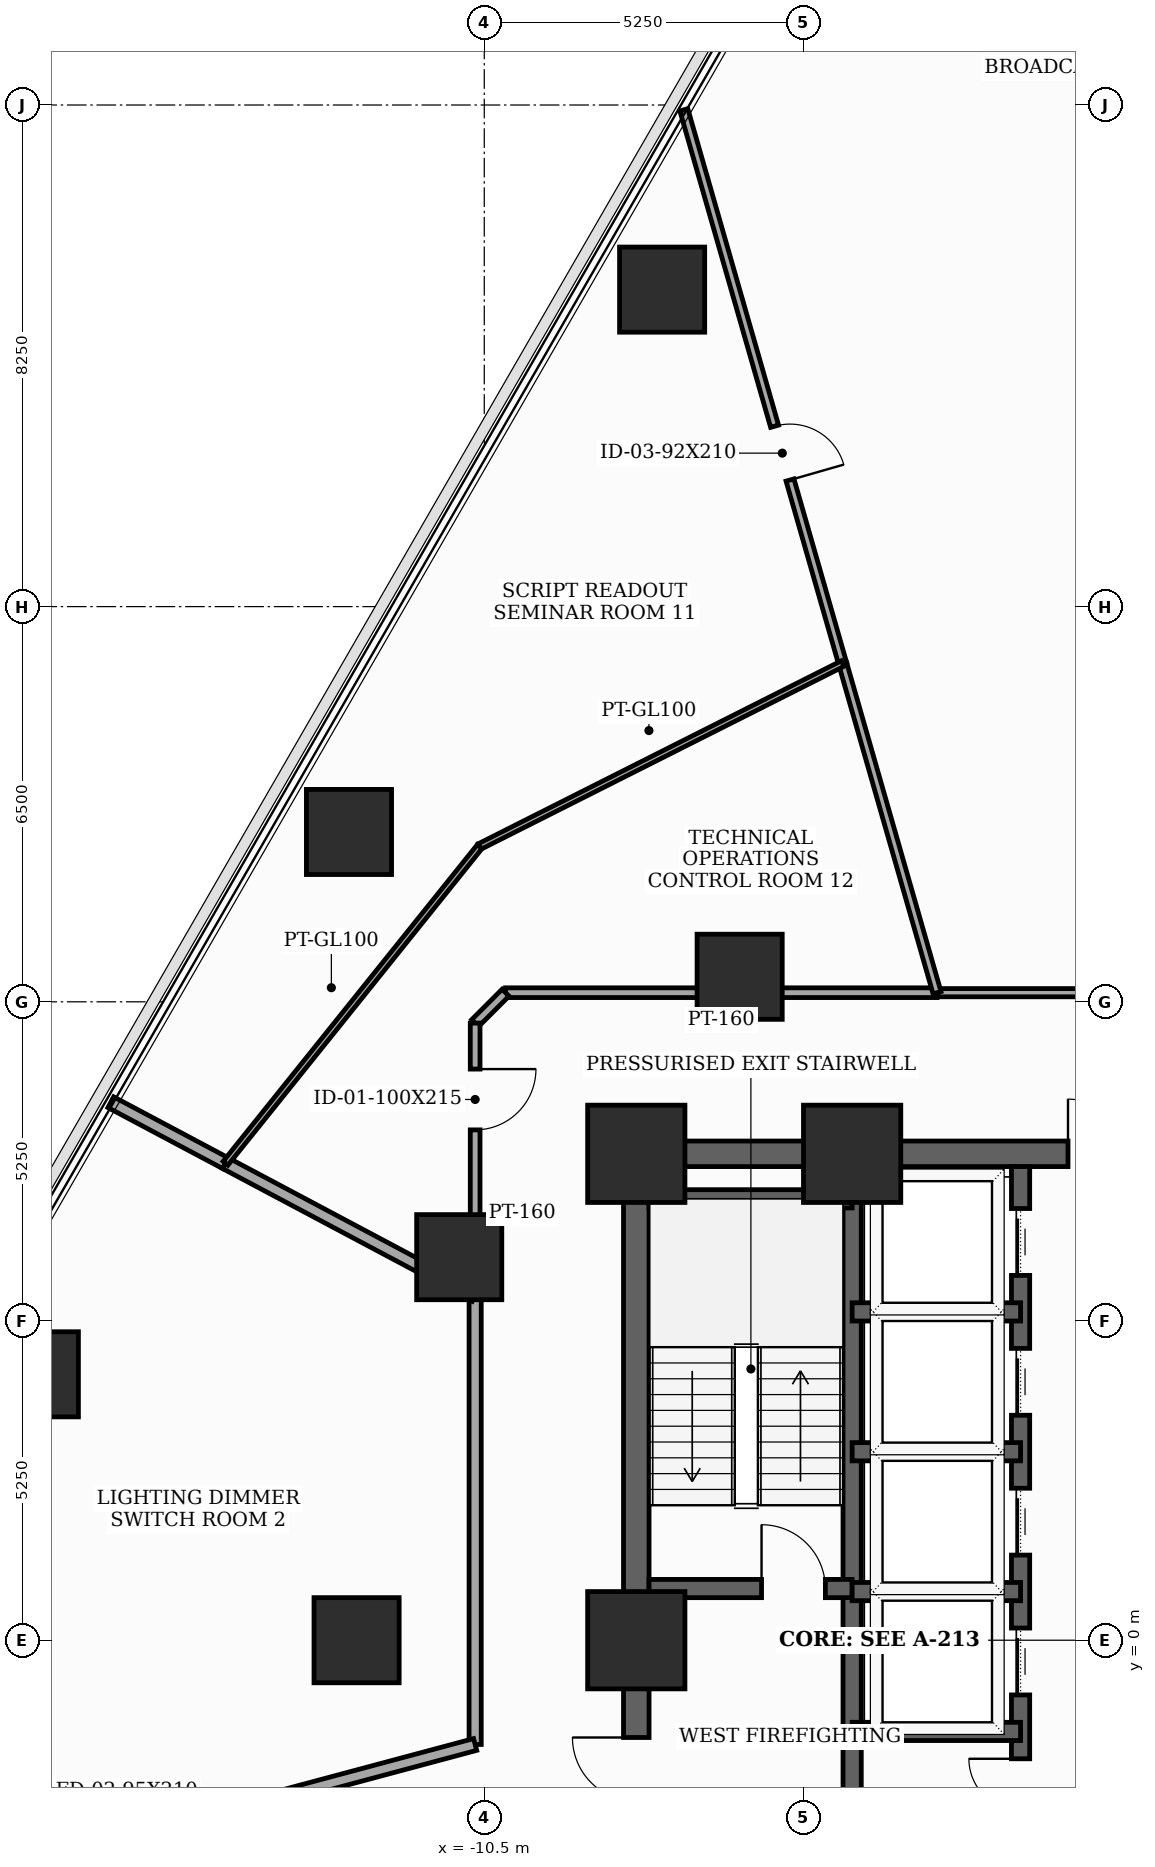
"""IFC4 building model, lengths in metres.
Left out: names, types, materials, properties, quantities, classifications, styles, units other than length and angle.
Written with IfcOpenShell. Run it as: python <this file> out.ifc"""

import sys

from ifc_helpers import new_model, si_unit, direction, frame, frame_2d, origin, origin_2d, place, context, subcontext, project, spatial, rectangle, extrude, element, fill, save


model = new_model("IFC4")
c1 = context("Model", 3, precision=1e-05, world=origin(), true_north=direction((0.0, 1.0)))
c2 = subcontext(c1, "Body", "Model", "MODEL_VIEW")
j1 = project(units=[si_unit("LENGTHUNIT", "METRE"), si_unit("PLANEANGLEUNIT", "RADIAN")], contexts=[c1])
p1 = place(None, origin())
s1 = spatial("IfcSite", under=j1, at=p1, CompositionType="ELEMENT")
p2 = place(p1, origin())
s2 = spatial("IfcBuilding", under=s1, at=p2, CompositionType="ELEMENT")
p3 = place(p2, frame((0.0, 0.0, 37.1)))
s3 = spatial("IfcBuildingStorey", under=s2, at=p3, CompositionType="ELEMENT", Elevation=37.1)
for number, where, z_axis, x_axis in (
    (1, (-4.45, 8.0, 0.0), (0.0, 0.0, 1.0), (1.0, 0.0, 0.0)),
    (2, (-8.0, 8.0, 0.0), (0.0, 0.0, 1.0), (1.0, 0.0, 0.0)),
    (3, (-8.0, 0.0, 0.0), (0.0, 0.0, 1.0), (1.0, 0.0, 0.0)),
):
    element("IfcColumn", number, at=place(p3, frame(where, z_axis=z_axis, x_axis=x_axis)), inside=s3, PredefinedType="COLUMN", context=c2, shape_type="SweptSolid", body=[
        extrude(rectangle(XDim=1.6, YDim=1.6, at=origin_2d()), origin(), (0.0, 0.0, 1.0), 3.7),
    ])
for number, where, z_axis, x_axis in (
    (4, (-6.3, 10.912, 0.0), (0.0, 0.0, 1.0), (1.0, 0.0, 0.0)),
    (5, (-10.912, 6.3, 0.0), (0.0, 0.0, 1.0), (1.0, 0.0, 0.0)),
    (6, (-12.6, 0.0, 0.0), (0.0, 0.0, 1.0), (1.0, 0.0, 0.0)),
    (7, (-7.575, 22.213, 0.0), (0.0, 0.0, 1.0), (1.0, 0.0, 0.0)),
    (8, (-12.725, 13.293, 0.0), (0.0, 0.0, 1.0), (1.0, 0.0, 0.0)),
    (9, (-17.875, 4.373, 0.0), (0.0, 0.0, 1.0), (1.0, 0.0, 0.0)),
):
    element("IfcColumn", number, at=place(p3, frame(where, z_axis=z_axis, x_axis=x_axis)), inside=s3, PredefinedType="COLUMN", context=c2, shape_type="SweptSolid", body=[
        extrude(rectangle(XDim=1.4, YDim=1.4, at=origin_2d()), origin(), (0.0, 0.0, 1.0), 3.7),
    ])
p4 = place(p3, frame((-8.0, -8.0, 0.0), z_axis=(0.0, 0.0, 1.0), x_axis=(0.0, 1.0, 0.0)))
e10 = element("IfcWall", 10, at=p4, inside=s3, PredefinedType="SHEAR", context=c2, shape_type="SweptSolid", body=[
    extrude(rectangle(XDim=16.0, YDim=0.42, at=frame_2d((8.0, 0.0))), origin(), (0.0, 0.0, 1.0), 3.5),
])
p5 = place(p4, frame((1.002, 0.0, 0.0)))
e11 = element("IfcOpeningElement", 11, at=p5, cuts=e10, PredefinedType="OPENING", context=c2, shape_type="SweptSolid", body=[
    extrude(rectangle(XDim=0.85, YDim=2.02, at=frame_2d((0.425, 1.01))), frame((0.0, 0.22, 0.0), z_axis=(0.0, -1.0, 0.0), x_axis=(1.0, 0.0, 0.0)), (0.0, 0.0, 1.0), 0.44),
])
p6 = place(p4, frame((5.35, 0.0, 0.0)))
e12 = element("IfcOpeningElement", 12, at=p6, cuts=e10, PredefinedType="OPENING", context=c2, shape_type="SweptSolid", body=[
    extrude(rectangle(XDim=1.05, YDim=2.15, at=frame_2d((0.525, 1.075))), frame((0.0, 0.22, 0.0), z_axis=(0.0, -1.0, 0.0), x_axis=(1.0, 0.0, 0.0)), (0.0, 0.0, 1.0), 0.44),
])
p7 = place(p3, frame((-8.0, 8.0, 0.0), z_axis=(0.0, 0.0, 1.0), x_axis=(1.0, 0.0, 0.0)))
e13 = element("IfcWall", 13, at=p7, inside=s3, PredefinedType="SHEAR", context=c2, shape_type="SweptSolid", body=[
    extrude(rectangle(XDim=16.0, YDim=0.42, at=frame_2d((8.0, 0.0))), origin(), (0.0, 0.0, 1.0), 3.5),
])
p8 = place(p7, frame((7.1, 0.0, 0.0)))
e14 = element("IfcOpeningElement", 14, at=p8, cuts=e13, PredefinedType="OPENING", context=c2, shape_type="SweptSolid", body=[
    extrude(rectangle(XDim=1.8, YDim=2.15, at=frame_2d((0.9, 1.075))), frame((0.0, 0.22, 0.0), z_axis=(0.0, -1.0, 0.0), x_axis=(1.0, 0.0, 0.0)), (0.0, 0.0, 1.0), 0.44),
])
p9 = place(p3, frame((-4.45, -7.79, 0.0), z_axis=(0.0, 0.0, 1.0), x_axis=(0.0, 1.0, 0.0)))
e15 = element("IfcWall", 15, at=p9, inside=s3, PredefinedType="SHEAR", context=c2, shape_type="SweptSolid", body=[
    extrude(rectangle(XDim=15.58, YDim=0.3, at=frame_2d((7.79, 0.0))), origin(), (0.0, 0.0, 1.0), 3.5),
])
p10 = place(p3, frame((-7.79, 0.85, 0.0), z_axis=(0.0, 0.0, 1.0), x_axis=(1.0, 0.0, 0.0)))
e16 = element("IfcWall", 16, at=p10, inside=s3, PredefinedType="SHEAR", context=c2, shape_type="SweptSolid", body=[
    extrude(rectangle(XDim=3.34, YDim=0.3, at=frame_2d((1.67, 0.0))), origin(), (0.0, 0.0, 1.0), 3.5),
])
p11 = place(p10, frame((1.85, 0.0, 0.0)))
e17 = element("IfcOpeningElement", 17, at=p11, cuts=e16, PredefinedType="OPENING", context=c2, shape_type="SweptSolid", body=[
    extrude(rectangle(XDim=1.05, YDim=2.15, at=frame_2d((0.525, 1.075))), frame((0.0, 0.16, 0.0), z_axis=(0.0, -1.0, 0.0), x_axis=(1.0, 0.0, 0.0)), (0.0, 0.0, 1.0), 0.32),
])
p12 = place(p3, frame((-7.79, 7.26, 0.0), z_axis=(0.0, 0.0, 1.0), x_axis=(1.0, 0.0, 0.0)))
e18 = element("IfcWall", 18, at=p12, inside=s3, PredefinedType="SHEAR", context=c2, shape_type="SweptSolid", body=[
    extrude(rectangle(XDim=3.34, YDim=0.3, at=frame_2d((1.67, 0.0))), origin(), (0.0, 0.0, 1.0), 3.5),
])
p13 = place(p3, frame((-1.68, -4.85, 0.0), z_axis=(0.0, 0.0, 1.0), x_axis=(0.0, 1.0, 0.0)))
e19 = element("IfcWall", 19, at=p13, inside=s3, PredefinedType="SHEAR", context=c2, shape_type="SweptSolid", body=[
    extrude(rectangle(XDim=12.64, YDim=0.3, at=frame_2d((6.32, 0.0))), origin(), (0.0, 0.0, 1.0), 3.5),
])
p14 = place(p13, frame((3.95, 0.0, 0.0)))
e20 = element("IfcOpeningElement", 20, at=p14, cuts=e19, PredefinedType="OPENING", context=c2, shape_type="SweptSolid", body=[
    extrude(rectangle(XDim=1.1, YDim=2.1, at=frame_2d((0.55, 1.05))), frame((0.0, 0.16, 0.0), z_axis=(0.0, -1.0, 0.0), x_axis=(1.0, 0.0, 0.0)), (0.0, 0.0, 1.0), 0.32),
])
p15 = place(p13, frame((6.25, 0.0, 0.0)))
e21 = element("IfcOpeningElement", 21, at=p15, cuts=e19, PredefinedType="OPENING", context=c2, shape_type="SweptSolid", body=[
    extrude(rectangle(XDim=1.1, YDim=2.1, at=frame_2d((0.55, 1.05))), frame((0.0, 0.16, 0.0), z_axis=(0.0, -1.0, 0.0), x_axis=(1.0, 0.0, 0.0)), (0.0, 0.0, 1.0), 0.32),
])
p16 = place(p13, frame((8.55, 0.0, 0.0)))
e22 = element("IfcOpeningElement", 22, at=p16, cuts=e19, PredefinedType="OPENING", context=c2, shape_type="SweptSolid", body=[
    extrude(rectangle(XDim=1.1, YDim=2.1, at=frame_2d((0.55, 1.05))), frame((0.0, 0.16, 0.0), z_axis=(0.0, -1.0, 0.0), x_axis=(1.0, 0.0, 0.0)), (0.0, 0.0, 1.0), 0.32),
])
p17 = place(p13, frame((10.85, 0.0, 0.0)))
e23 = element("IfcOpeningElement", 23, at=p17, cuts=e19, PredefinedType="OPENING", context=c2, shape_type="SweptSolid", body=[
    extrude(rectangle(XDim=1.1, YDim=2.1, at=frame_2d((0.55, 1.05))), frame((0.0, 0.16, 0.0), z_axis=(0.0, -1.0, 0.0), x_axis=(1.0, 0.0, 0.0)), (0.0, 0.0, 1.0), 0.32),
])
p18 = place(p13, frame((0.45, 0.0, 0.0)))
e24 = element("IfcOpeningElement", 24, at=p18, cuts=e19, PredefinedType="OPENING", context=c2, shape_type="SweptSolid", body=[
    extrude(rectangle(XDim=0.85, YDim=2.02, at=frame_2d((0.425, 1.01))), frame((0.0, 0.16, 0.0), z_axis=(0.0, -1.0, 0.0), x_axis=(1.0, 0.0, 0.0)), (0.0, 0.0, 1.0), 0.32),
])
p19 = place(p13, frame((2.05, 0.0, 0.0)))
e25 = element("IfcOpeningElement", 25, at=p19, cuts=e19, PredefinedType="OPENING", context=c2, shape_type="SweptSolid", body=[
    extrude(rectangle(XDim=0.85, YDim=2.02, at=frame_2d((0.425, 1.01))), frame((0.0, 0.16, 0.0), z_axis=(0.0, -1.0, 0.0), x_axis=(1.0, 0.0, 0.0)), (0.0, 0.0, 1.0), 0.32),
])
for number, where, z_axis, x_axis in (
    (26, (-4.45, -1.5, 0.0), (0.0, 0.0, 1.0), (1.0, 0.0, 0.0)),
    (27, (-4.45, 0.8, 0.0), (0.0, 0.0, 1.0), (1.0, 0.0, 0.0)),
    (28, (-4.45, 3.1, 0.0), (0.0, 0.0, 1.0), (1.0, 0.0, 0.0)),
    (29, (-4.45, 5.4, 0.0), (0.0, 0.0, 1.0), (1.0, 0.0, 0.0)),
):
    element("IfcWall", number, at=place(p3, frame(where, z_axis=z_axis, x_axis=x_axis)), inside=s3, PredefinedType="SHEAR", context=c2, shape_type="SweptSolid", body=[
        extrude(rectangle(XDim=2.77, YDim=0.3, at=frame_2d((1.385, 0.0))), origin(), (0.0, 0.0, 1.0), 3.5),
    ])
p20 = place(p3, frame((1.715, 10.65, 0.0), z_axis=(0.0, 0.0, 1.0), x_axis=(-1.0, 0.0, 0.0)))
e30 = element("IfcWall", 30, at=p20, inside=s3, PredefinedType="PARTITIONING", context=c2, shape_type="SweptSolid", body=[
    extrude(rectangle(XDim=4.769, YDim=0.135, at=frame_2d((2.385, 0.0))), origin(), (0.0, 0.0, 1.0), 2.785),
])
p21 = place(p3, frame((-10.65, 5.663, 0.0), z_axis=(0.0, 0.0, 1.0), x_axis=(0.0, -1.0, 0.0)))
e31 = element("IfcWall", 31, at=p21, inside=s3, PredefinedType="SOLIDWALL", context=c2, shape_type="SweptSolid", body=[
    extrude(rectangle(XDim=7.378, YDim=0.2, at=frame_2d((3.689, 0.0))), origin(), (0.0, 0.0, 1.0), 2.785),
])
p22 = place(p3, frame((-10.65, -1.715, 0.0), z_axis=(0.0, 0.0, 1.0), x_axis=(-0.965926659449, -0.258815935688, 0.0)))
e32 = element("IfcWall", 32, at=p22, inside=s3, PredefinedType="SOLIDWALL", context=c2, shape_type="SweptSolid", body=[
    extrude(rectangle(XDim=11.87, YDim=0.2, at=frame_2d((5.935, 0.0))), origin(), (0.0, 0.0, 1.0), 2.785),
])
p23 = place(p22, frame((5.46, 0.0, 0.0)))
e33 = element("IfcOpeningElement", 33, at=p23, cuts=e32, PredefinedType="OPENING", context=c2, shape_type="SweptSolid", body=[
    extrude(rectangle(XDim=0.95, YDim=2.1, at=frame_2d((0.475, 1.05))), frame((0.0, 0.11, 0.0), z_axis=(0.0, -1.0, 0.0), x_axis=(1.0, 0.0, 0.0)), (0.0, 0.0, 1.0), 0.22),
])
p24 = place(p3, frame((-3.054, 10.65, 0.0), z_axis=(0.0, 0.0, 1.0), x_axis=(-1.0, 0.0, 0.0)))
e34 = element("IfcWall", 34, at=p24, inside=s3, PredefinedType="PARTITIONING", context=c2, shape_type="SweptSolid", body=[
    extrude(rectangle(XDim=7.096, YDim=0.16, at=frame_2d((3.548, 0.0))), origin(), (0.0, 0.0, 1.0), 2.685),
])
p25 = place(p3, frame((-10.15, 10.65, 0.0), z_axis=(0.0, 0.0, 1.0), x_axis=(-0.707106781187, -0.707106781187, 0.0)))
e35 = element("IfcWall", 35, at=p25, inside=s3, PredefinedType="PARTITIONING", context=c2, shape_type="SweptSolid", body=[
    extrude(rectangle(XDim=0.707, YDim=0.16, at=frame_2d((0.354, 0.0))), origin(), (0.0, 0.0, 1.0), 3.5),
])
p26 = place(p3, frame((-10.65, 10.15, 0.0), z_axis=(0.0, 0.0, 1.0), x_axis=(0.0, -1.0, 0.0)))
e36 = element("IfcWall", 36, at=p26, inside=s3, PredefinedType="PARTITIONING", context=c2, shape_type="SweptSolid", body=[
    extrude(rectangle(XDim=4.487, YDim=0.16, at=frame_2d((2.243, 0.0))), origin(), (0.0, 0.0, 1.0), 2.785),
])
p27 = place(p26, frame((0.756, 0.0, 0.0)))
e37 = element("IfcOpeningElement", 37, at=p27, cuts=e36, PredefinedType="OPENING", context=c2, shape_type="SweptSolid", body=[
    extrude(rectangle(XDim=1.0, YDim=2.15, at=frame_2d((0.5, 1.075))), frame((0.0, 0.09, 0.0), z_axis=(0.0, -1.0, 0.0), x_axis=(1.0, 0.0, 0.0)), (0.0, 0.0, 1.0), 0.18),
])
p28 = place(p3, frame((-7.218, 25.171, 0.0), z_axis=(0.0, 0.0, 1.0), x_axis=(0.275694254482, -0.961245378686, 0.0)))
e38 = element("IfcWall", 38, at=p28, inside=s3, PredefinedType="PARTITIONING", context=c2, shape_type="SweptSolid", body=[
    extrude(rectangle(XDim=9.475, YDim=0.135, at=frame_2d((4.738, 0.0))), origin(), (0.0, 0.0, 1.0), 2.935),
])
p29 = place(p28, frame((5.415, 0.0, 0.0)))
e39 = element("IfcOpeningElement", 39, at=p29, cuts=e38, PredefinedType="OPENING", context=c2, shape_type="SweptSolid", body=[
    extrude(rectangle(XDim=0.92, YDim=2.1, at=frame_2d((0.46, 1.05))), frame((0.0, 0.077, 0.0), z_axis=(0.0, -1.0, 0.0), x_axis=(1.0, 0.0, 0.0)), (0.0, 0.0, 1.0), 0.155),
])
p30 = place(p3, frame((-4.606, 16.063, 0.0), z_axis=(0.0, 0.0, 1.0), x_axis=(0.275608564, -0.961269951392, 0.0)))
e40 = element("IfcWall", 40, at=p30, inside=s3, PredefinedType="PARTITIONING", context=c2, shape_type="SweptSolid", body=[
    extrude(rectangle(XDim=5.631, YDim=0.135, at=frame_2d((2.815, 0.0))), origin(), (0.0, 0.0, 1.0), 2.785),
])
p31 = place(p3, frame((-14.755, 7.845, 0.0), z_axis=(0.0, 0.0, 1.0), x_axis=(-0.882905636776, 0.469550462197, 0.0)))
e41 = element("IfcWall", 41, at=p31, inside=s3, PredefinedType="SOLIDWALL", context=c2, shape_type="SweptSolid", body=[
    extrude(rectangle(XDim=2.137, YDim=0.2, at=frame_2d((1.069, 0.0))), origin(), (0.0, 0.0, 1.0), 2.935),
])
p32 = place(p3, frame((-10.65, 5.663, 0.0), z_axis=(0.0, 0.0, 1.0), x_axis=(-0.883016425854, 0.46934208385, 0.0)))
e42 = element("IfcWall", 42, at=p32, inside=s3, PredefinedType="SOLIDWALL", context=c2, shape_type="SweptSolid", body=[
    extrude(rectangle(XDim=4.649, YDim=0.2, at=frame_2d((2.324, 0.0))), origin(), (0.0, 0.0, 1.0), 2.785),
])
p33 = place(p3, frame((-14.755, 7.845, 0.0), z_axis=(0.0, 0.0, 1.0), x_axis=(0.625893000506, 0.779908938222, 0.0)))
e43 = element("IfcWall", 43, at=p33, inside=s3, PredefinedType="MOVABLE", context=c2, shape_type="SweptSolid", body=[
    extrude(rectangle(XDim=6.681, YDim=0.1, at=frame_2d((3.341, 0.0))), origin(), (0.0, 0.0, 1.0), 2.685),
])
p34 = place(p3, frame((-10.573, 13.056, 0.0), z_axis=(0.0, 0.0, 1.0), x_axis=(0.893012396789, 0.450032064615, 0.0)))
e44 = element("IfcWall", 44, at=p34, inside=s3, PredefinedType="MOVABLE", context=c2, shape_type="SweptSolid", body=[
    extrude(rectangle(XDim=6.682, YDim=0.1, at=frame_2d((3.341, 0.0))), origin(), (0.0, 0.0, 1.0), 2.685),
])
p35 = place(p6, origin())
e45 = element("IfcDoor", 45, at=p35, inside=s3, OperationType="SINGLE_SWING_RIGHT", PredefinedType="DOOR", context=c2, shape_type="SweptSolid", body=[
    extrude(rectangle(XDim=1.05, YDim=2.15, at=frame_2d((0.525, 1.075))), frame((0.0, 0.025, 0.0), z_axis=(0.0, -1.0, 0.0), x_axis=(1.0, 0.0, 0.0)), (0.0, 0.0, 1.0), 0.05),
])
fill(e12, e45)
p36 = place(p8, origin())
e46 = element("IfcDoor", 46, at=p36, inside=s3, OperationType="DOUBLE_DOOR_SINGLE_SWING", PredefinedType="DOOR", context=c2, shape_type="SweptSolid", body=[
    extrude(rectangle(XDim=1.8, YDim=2.15, at=frame_2d((0.9, 1.075))), frame((0.0, 0.025, 0.0), z_axis=(0.0, -1.0, 0.0), x_axis=(1.0, 0.0, 0.0)), (0.0, 0.0, 1.0), 0.05),
])
fill(e14, e46)
p37 = place(p11, origin())
e47 = element("IfcDoor", 47, at=p37, inside=s3, OperationType="SINGLE_SWING_LEFT", PredefinedType="DOOR", context=c2, shape_type="SweptSolid", body=[
    extrude(rectangle(XDim=1.05, YDim=2.15, at=frame_2d((0.525, 1.075))), frame((0.0, 0.025, 0.0), z_axis=(0.0, -1.0, 0.0), x_axis=(1.0, 0.0, 0.0)), (0.0, 0.0, 1.0), 0.05),
])
fill(e17, e47)
p38 = place(p14, origin())
e48 = element("IfcDoor", 48, at=p38, inside=s3, OperationType="SLIDING_TO_LEFT", PredefinedType="DOOR", context=c2, shape_type="SweptSolid", body=[
    extrude(rectangle(XDim=1.1, YDim=2.1, at=frame_2d((0.55, 1.05))), frame((0.0, 0.025, 0.0), z_axis=(0.0, -1.0, 0.0), x_axis=(1.0, 0.0, 0.0)), (0.0, 0.0, 1.0), 0.05),
])
fill(e20, e48)
p39 = place(p15, origin())
e49 = element("IfcDoor", 49, at=p39, inside=s3, OperationType="SLIDING_TO_LEFT", PredefinedType="DOOR", context=c2, shape_type="SweptSolid", body=[
    extrude(rectangle(XDim=1.1, YDim=2.1, at=frame_2d((0.55, 1.05))), frame((0.0, 0.025, 0.0), z_axis=(0.0, -1.0, 0.0), x_axis=(1.0, 0.0, 0.0)), (0.0, 0.0, 1.0), 0.05),
])
fill(e21, e49)
p40 = place(p16, origin())
e50 = element("IfcDoor", 50, at=p40, inside=s3, OperationType="SLIDING_TO_LEFT", PredefinedType="DOOR", context=c2, shape_type="SweptSolid", body=[
    extrude(rectangle(XDim=1.1, YDim=2.1, at=frame_2d((0.55, 1.05))), frame((0.0, 0.025, 0.0), z_axis=(0.0, -1.0, 0.0), x_axis=(1.0, 0.0, 0.0)), (0.0, 0.0, 1.0), 0.05),
])
fill(e22, e50)
p41 = place(p17, origin())
e51 = element("IfcDoor", 51, at=p41, inside=s3, OperationType="SLIDING_TO_LEFT", PredefinedType="DOOR", context=c2, shape_type="SweptSolid", body=[
    extrude(rectangle(XDim=1.1, YDim=2.1, at=frame_2d((0.55, 1.05))), frame((0.0, 0.025, 0.0), z_axis=(0.0, -1.0, 0.0), x_axis=(1.0, 0.0, 0.0)), (0.0, 0.0, 1.0), 0.05),
])
fill(e23, e51)
p42 = place(p19, origin())
e52 = element("IfcDoor", 52, at=p42, inside=s3, OperationType="SINGLE_SWING_RIGHT", PredefinedType="TRAPDOOR", context=c2, shape_type="SweptSolid", body=[
    extrude(rectangle(XDim=0.85, YDim=2.02, at=frame_2d((0.425, 1.01))), frame((0.0, 0.025, 0.0), z_axis=(0.0, -1.0, 0.0), x_axis=(1.0, 0.0, 0.0)), (0.0, 0.0, 1.0), 0.05),
])
fill(e25, e52)
p43 = place(p27, origin())
e53 = element("IfcDoor", 53, at=p43, inside=s3, OperationType="SINGLE_SWING_LEFT", PredefinedType="DOOR", context=c2, shape_type="SweptSolid", body=[
    extrude(rectangle(XDim=1.0, YDim=2.15, at=frame_2d((0.5, 1.075))), frame((0.0, 0.025, 0.0), z_axis=(0.0, -1.0, 0.0), x_axis=(1.0, 0.0, 0.0)), (0.0, 0.0, 1.0), 0.05),
])
fill(e37, e53)
p44 = place(p29, origin())
e54 = element("IfcDoor", 54, at=p44, inside=s3, OperationType="SINGLE_SWING_RIGHT", PredefinedType="DOOR", context=c2, shape_type="SweptSolid", body=[
    extrude(rectangle(XDim=0.92, YDim=2.1, at=frame_2d((0.46, 1.05))), frame((0.0, 0.025, 0.0), z_axis=(0.0, -1.0, 0.0), x_axis=(1.0, 0.0, 0.0)), (0.0, 0.0, 1.0), 0.05),
])
fill(e39, e54)
save(model, sys.argv[1])
